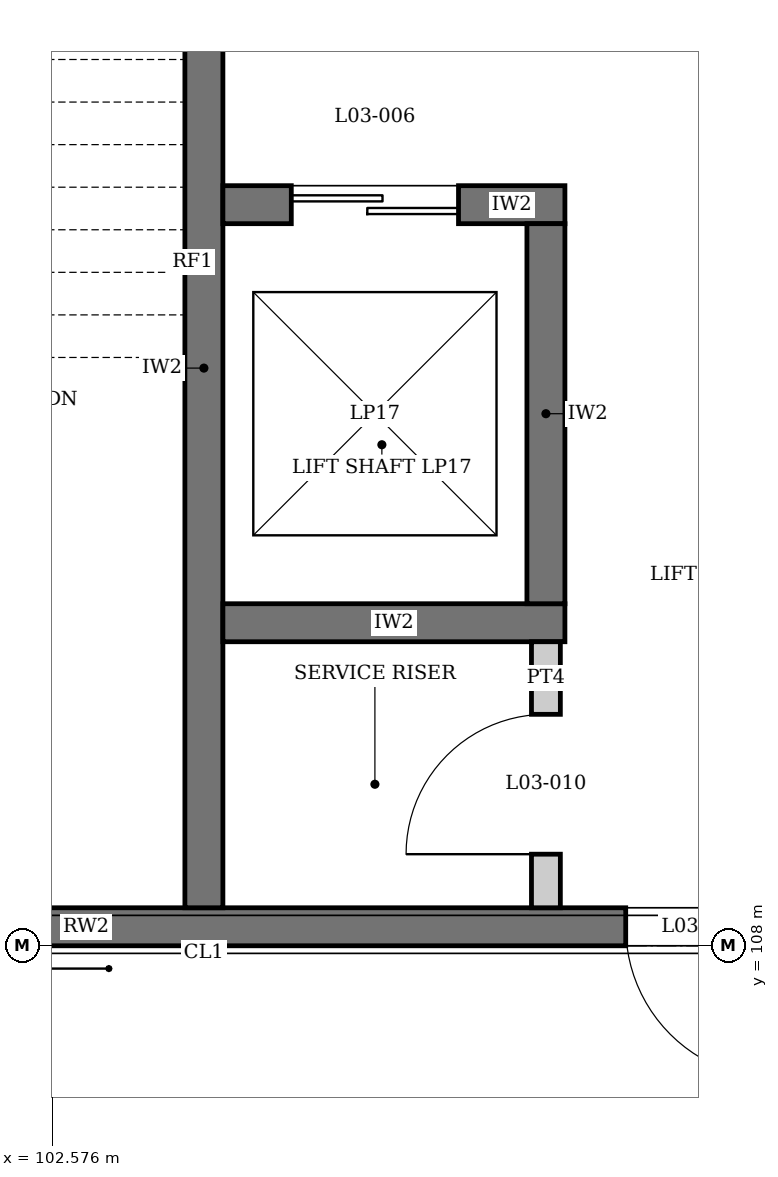
"""IFC4 building model, lengths in metres.
Left out: names, types, materials, properties, quantities, classifications, styles, units other than length and angle.
Written with IfcOpenShell. Run it as: python <this file> out.ifc"""

import sys

from ifc_helpers import new_model, si_unit, direction, frame, frame_2d, origin, place, context, subcontext, project, spatial, rectangle, extrude, element, fill, save


model = new_model("IFC4")
c1 = context("Model", 3, precision=1e-05, world=origin(), true_north=direction((0.0, 1.0)))
c2 = subcontext(c1, "Body", "Model", "MODEL_VIEW")
j1 = project(units=[si_unit("LENGTHUNIT", "METRE"), si_unit("PLANEANGLEUNIT", "RADIAN")], contexts=[c1])
p1 = place(None, origin())
s1 = spatial("IfcSite", under=j1, at=p1, CompositionType="ELEMENT")
p2 = place(p1, origin())
s2 = spatial("IfcBuilding", under=s1, at=p2, CompositionType="ELEMENT")
p3 = place(p2, frame((0.0, 0.0, 15.0)))
s3 = spatial("IfcBuildingStorey", under=s2, at=p3, CompositionType="ELEMENT", Elevation=15.0)
p4 = place(p3, frame((99.25, 108.125, 0.0), z_axis=(0.0, 0.0, 1.0), x_axis=(1.0, 0.0, 0.0)))
e1 = element("IfcWall", 1, at=p4, inside=s3, PredefinedType="SHEAR", context=c2, shape_type="SweptSolid", body=[
    extrude(rectangle(XDim=8.5, YDim=0.25, at=frame_2d((4.25, 0.0))), origin(), (0.0, 0.0, 1.0), 4.05),
])
p5 = place(p4, frame((7.1, 0.0, 0.0)))
e2 = element("IfcOpeningElement", 2, at=p5, cuts=e1, PredefinedType="OPENING", context=c2, shape_type="SweptSolid", body=[
    extrude(rectangle(XDim=1.0, YDim=2.1, at=frame_2d((0.5, 1.05))), frame((0.0, 0.135, 0.0), z_axis=(0.0, -1.0, 0.0), x_axis=(1.0, 0.0, 0.0)), (0.0, 0.0, 1.0), 0.27),
])
p6 = place(p3, frame((103.575, 116.75, 0.0), z_axis=(0.0, 0.0, 1.0), x_axis=(0.0, -1.0, 0.0)))
e3 = element("IfcWall", 3, at=p6, inside=s3, PredefinedType="SOLIDWALL", context=c2, shape_type="SweptSolid", body=[
    extrude(rectangle(XDim=8.5, YDim=0.25, at=frame_2d((4.25, 0.0))), origin(), (0.0, 0.0, 1.0), 3.95),
])
p7 = place(p6, frame((0.4, 0.0, 0.0)))
e4 = element("IfcOpeningElement", 4, at=p7, cuts=e3, PredefinedType="OPENING", context=c2, shape_type="SweptSolid", body=[
    extrude(rectangle(XDim=1.0, YDim=2.1, at=frame_2d((0.5, 1.05))), frame((0.0, 0.135, 0.0), z_axis=(0.0, -1.0, 0.0), x_axis=(1.0, 0.0, 0.0)), (0.0, 0.0, 1.0), 0.27),
])
p8 = place(p3, frame((103.7, 110.125, 0.0), z_axis=(0.0, 0.0, 1.0), x_axis=(1.0, 0.0, 0.0)))
e5 = element("IfcWall", 5, at=p8, inside=s3, PredefinedType="SOLIDWALL", context=c2, shape_type="SweptSolid", body=[
    extrude(rectangle(XDim=2.25, YDim=0.25, at=frame_2d((1.125, 0.0))), origin(), (0.0, 0.0, 1.0), 3.9),
])
p9 = place(p3, frame((103.7, 112.875, 0.0), z_axis=(0.0, 0.0, 1.0), x_axis=(1.0, 0.0, 0.0)))
e6 = element("IfcWall", 6, at=p9, inside=s3, PredefinedType="SOLIDWALL", context=c2, shape_type="SweptSolid", body=[
    extrude(rectangle(XDim=2.25, YDim=0.25, at=frame_2d((1.125, 0.0))), origin(), (0.0, 0.0, 1.0), 3.9),
])
p10 = place(p9, frame((0.45, 0.0, 0.0)))
e7 = element("IfcOpeningElement", 7, at=p10, cuts=e6, PredefinedType="OPENING", context=c2, shape_type="SweptSolid", body=[
    extrude(rectangle(XDim=1.1, YDim=2.1, at=frame_2d((0.55, 1.05))), frame((0.0, 0.135, 0.0), z_axis=(0.0, -1.0, 0.0), x_axis=(1.0, 0.0, 0.0)), (0.0, 0.0, 1.0), 0.27),
])
p11 = place(p3, frame((105.825, 110.25, 0.0), z_axis=(0.0, 0.0, 1.0), x_axis=(0.0, 1.0, 0.0)))
e8 = element("IfcWall", 8, at=p11, inside=s3, PredefinedType="SOLIDWALL", context=c2, shape_type="SweptSolid", body=[
    extrude(rectangle(XDim=2.5, YDim=0.25, at=frame_2d((1.25, 0.0))), origin(), (0.0, 0.0, 1.0), 3.9),
])
p12 = place(p3, frame((105.825, 108.25, 0.0), z_axis=(0.0, 0.0, 1.0), x_axis=(0.0, 1.0, 0.0)))
e9 = element("IfcWall", 9, at=p12, inside=s3, PredefinedType="PARTITIONING", context=c2, shape_type="SweptSolid", body=[
    extrude(rectangle(XDim=1.75, YDim=0.19, at=frame_2d((0.875, 0.0))), origin(), (0.0, 0.0, 1.0), 3.45),
])
p13 = place(p12, frame((0.353, 0.0, 0.0)))
e10 = element("IfcOpeningElement", 10, at=p13, cuts=e9, PredefinedType="OPENING", context=c2, shape_type="SweptSolid", body=[
    extrude(rectangle(XDim=0.92, YDim=2.1, at=frame_2d((0.46, 1.05))), frame((0.0, 0.105, 0.0), z_axis=(0.0, -1.0, 0.0), x_axis=(1.0, 0.0, 0.0)), (0.0, 0.0, 1.0), 0.21),
])
p14 = place(p5, frame((1.0, 0.0, 0.0), z_axis=(0.0, 0.0, 1.0), x_axis=(-1.0, 0.0, 0.0)))
e11 = element("IfcDoor", 11, at=p14, inside=s3, OperationType="SINGLE_SWING_LEFT", PredefinedType="DOOR", context=c2, shape_type="SweptSolid", body=[
    extrude(rectangle(XDim=1.0, YDim=2.1, at=frame_2d((0.5, 1.05))), frame((0.0, 0.025, 0.0), z_axis=(0.0, -1.0, 0.0), x_axis=(1.0, 0.0, 0.0)), (0.0, 0.0, 1.0), 0.05),
])
fill(e2, e11)
p15 = place(p10, origin())
e12 = element("IfcDoor", 12, at=p15, inside=s3, OperationType="DOUBLE_DOOR_SLIDING", PredefinedType="DOOR", context=c2, shape_type="SweptSolid", body=[
    extrude(rectangle(XDim=1.1, YDim=2.1, at=frame_2d((0.55, 1.05))), frame((0.0, 0.025, 0.0), z_axis=(0.0, -1.0, 0.0), x_axis=(1.0, 0.0, 0.0)), (0.0, 0.0, 1.0), 0.05),
])
fill(e7, e12)
p16 = place(p13, origin())
e13 = element("IfcDoor", 13, at=p16, inside=s3, OperationType="SINGLE_SWING_LEFT", PredefinedType="DOOR", context=c2, shape_type="SweptSolid", body=[
    extrude(rectangle(XDim=0.92, YDim=2.1, at=frame_2d((0.46, 1.05))), frame((0.0, 0.025, 0.0), z_axis=(0.0, -1.0, 0.0), x_axis=(1.0, 0.0, 0.0)), (0.0, 0.0, 1.0), 0.05),
])
fill(e10, e13)
save(model, sys.argv[1])
